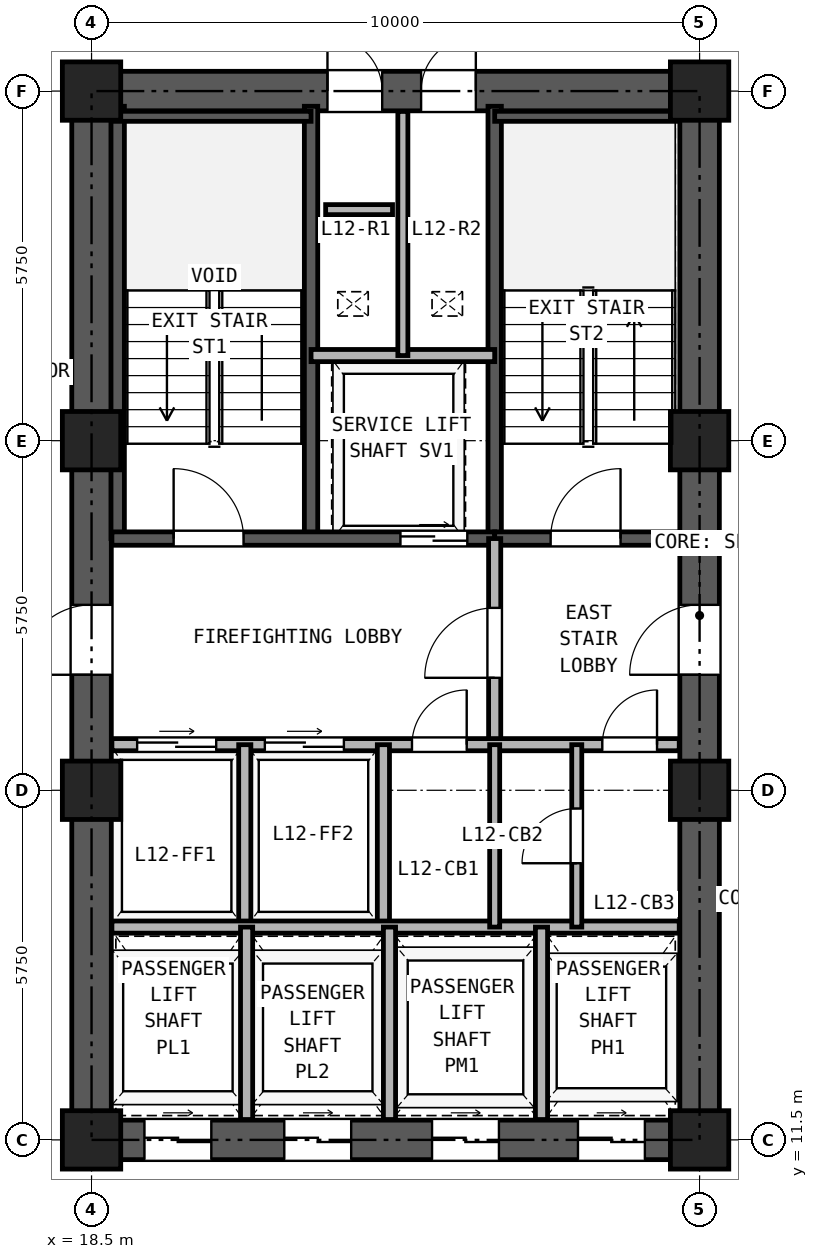
"""IFC4 building model, lengths in metres.
Left out: names, types, materials, properties, quantities, classifications, styles, units other than length and angle.
Written with IfcOpenShell. Run it as: python <this file> out.ifc"""

import sys

from ifc_helpers import new_model, si_unit, direction, frame, frame_2d, origin, origin_2d, place, context, subcontext, project, spatial, rectangle, hollow_rectangle, extrude, source, transform, mapped, element, fill, save


model = new_model("IFC4")
c1 = context("Model", 3, precision=1e-05, world=origin(), true_north=direction((0.0, 1.0)))
c2 = subcontext(c1, "Body", "Model", "MODEL_VIEW")
j1 = project(units=[si_unit("LENGTHUNIT", "METRE"), si_unit("PLANEANGLEUNIT", "RADIAN")], contexts=[c1])
p1 = place(None, origin())
s1 = spatial("IfcSite", under=j1, at=p1, CompositionType="ELEMENT")
p2 = place(p1, origin())
s2 = spatial("IfcBuilding", under=s1, at=p2, CompositionType="ELEMENT")
p3 = place(p2, frame((0.0, 0.0, 47.7)))
s3 = spatial("IfcBuildingStorey", under=s2, at=p3, CompositionType="ELEMENT", Elevation=47.7)
m1 = source(origin(), c2, "Body", "SweptSolid", [
    extrude(hollow_rectangle(XDim=0.96, YDim=0.96, WallThickness=0.06, at=origin_2d()), origin(), (0.0, 0.0, 1.0), 3.32),
])
for number, where, z_axis, x_axis in (
    (1, (18.5, 11.5, 0.0), (0.0, 0.0, 1.0), (1.0, 0.0, 0.0)),
    (2, (18.5, 17.25, 0.0), (0.0, 0.0, 1.0), (1.0, 0.0, 0.0)),
    (3, (18.5, 23.0, 0.0), (0.0, 0.0, 1.0), (1.0, 0.0, 0.0)),
    (4, (18.5, 28.75, 0.0), (0.0, 0.0, 1.0), (1.0, 0.0, 0.0)),
    (5, (28.5, 11.5, 0.0), (0.0, 0.0, 1.0), (1.0, 0.0, 0.0)),
    (6, (28.5, 17.25, 0.0), (0.0, 0.0, 1.0), (1.0, 0.0, 0.0)),
    (7, (28.5, 23.0, 0.0), (0.0, 0.0, 1.0), (1.0, 0.0, 0.0)),
    (8, (28.5, 28.75, 0.0), (0.0, 0.0, 1.0), (1.0, 0.0, 0.0)),
):
    element("IfcColumn", number, at=place(p3, frame(where, z_axis=z_axis, x_axis=x_axis)), inside=s3, PredefinedType="COLUMN", context=c2, shape_type="MappedRepresentation", body=[
        mapped(m1, transform((0.0, 0.0, 0.0), x_axis=(1.0, 0.0, 0.0), y_axis=(0.0, 1.0, 0.0), z_axis=(0.0, 0.0, 1.0), scale=1.0)),
    ])
p4 = place(p3, frame((18.175, 11.5, 0.0), z_axis=(0.0, 0.0, 1.0), x_axis=(1.0, 0.0, 0.0)))
e9 = element("IfcWall", 9, at=p4, inside=s3, PredefinedType="SHEAR", context=c2, shape_type="SweptSolid", body=[
    extrude(rectangle(XDim=10.65, YDim=0.65, at=frame_2d((5.325, 0.0))), origin(), (0.0, 0.0, 1.0), 3.32),
])
p5 = place(p4, frame((1.195, 0.0, 0.0)))
e10 = element("IfcOpeningElement", 10, at=p5, cuts=e9, PredefinedType="OPENING", context=c2, shape_type="SweptSolid", body=[
    extrude(rectangle(XDim=1.1, YDim=2.25, at=frame_2d((0.55, 1.125))), frame((0.0, 0.335, 0.0), z_axis=(0.0, -1.0, 0.0), x_axis=(1.0, 0.0, 0.0)), (0.0, 0.0, 1.0), 0.67),
])
p6 = place(p4, frame((3.495, 0.0, 0.0)))
e11 = element("IfcOpeningElement", 11, at=p6, cuts=e9, PredefinedType="OPENING", context=c2, shape_type="SweptSolid", body=[
    extrude(rectangle(XDim=1.1, YDim=2.25, at=frame_2d((0.55, 1.125))), frame((0.0, 0.335, 0.0), z_axis=(0.0, -1.0, 0.0), x_axis=(1.0, 0.0, 0.0)), (0.0, 0.0, 1.0), 0.67),
])
p7 = place(p4, frame((5.925, 0.0, 0.0)))
e12 = element("IfcOpeningElement", 12, at=p7, cuts=e9, PredefinedType="OPENING", context=c2, shape_type="SweptSolid", body=[
    extrude(rectangle(XDim=1.1, YDim=2.25, at=frame_2d((0.55, 1.125))), frame((0.0, 0.335, 0.0), z_axis=(0.0, -1.0, 0.0), x_axis=(1.0, 0.0, 0.0)), (0.0, 0.0, 1.0), 0.67),
])
p8 = place(p4, frame((8.325, 0.0, 0.0)))
e13 = element("IfcOpeningElement", 13, at=p8, cuts=e9, PredefinedType="OPENING", context=c2, shape_type="SweptSolid", body=[
    extrude(rectangle(XDim=1.1, YDim=2.25, at=frame_2d((0.55, 1.125))), frame((0.0, 0.335, 0.0), z_axis=(0.0, -1.0, 0.0), x_axis=(1.0, 0.0, 0.0)), (0.0, 0.0, 1.0), 0.67),
])
p9 = place(p3, frame((18.175, 28.75, 0.0), z_axis=(0.0, 0.0, 1.0), x_axis=(1.0, 0.0, 0.0)))
e14 = element("IfcWall", 14, at=p9, inside=s3, PredefinedType="SHEAR", context=c2, shape_type="SweptSolid", body=[
    extrude(rectangle(XDim=10.65, YDim=0.65, at=frame_2d((5.325, 0.0))), origin(), (0.0, 0.0, 1.0), 3.32),
])
p10 = place(p9, frame((4.205, 0.0, 0.0)))
e15 = element("IfcOpeningElement", 15, at=p10, cuts=e14, PredefinedType="OPENING", context=c2, shape_type="SweptSolid", body=[
    extrude(rectangle(XDim=0.9, YDim=2.05, at=frame_2d((0.45, 1.025))), frame((0.0, 0.335, 0.0), z_axis=(0.0, -1.0, 0.0), x_axis=(1.0, 0.0, 0.0)), (0.0, 0.0, 1.0), 0.67),
])
p11 = place(p9, frame((5.745, 0.0, 0.0)))
e16 = element("IfcOpeningElement", 16, at=p11, cuts=e14, PredefinedType="OPENING", context=c2, shape_type="SweptSolid", body=[
    extrude(rectangle(XDim=0.9, YDim=2.05, at=frame_2d((0.45, 1.025))), frame((0.0, 0.335, 0.0), z_axis=(0.0, -1.0, 0.0), x_axis=(1.0, 0.0, 0.0)), (0.0, 0.0, 1.0), 0.67),
])
p12 = place(p3, frame((18.5, 11.825, 0.0), z_axis=(0.0, 0.0, 1.0), x_axis=(0.0, 1.0, 0.0)))
e17 = element("IfcWall", 17, at=p12, inside=s3, PredefinedType="SHEAR", context=c2, shape_type="SweptSolid", body=[
    extrude(rectangle(XDim=16.6, YDim=0.65, at=frame_2d((8.3, 0.0))), origin(), (0.0, 0.0, 1.0), 3.32),
])
p13 = place(p12, frame((7.325, 0.0, 0.0)))
e18 = element("IfcOpeningElement", 18, at=p13, cuts=e17, PredefinedType="OPENING", context=c2, shape_type="SweptSolid", body=[
    extrude(rectangle(XDim=1.15, YDim=2.2, at=frame_2d((0.575, 1.1))), frame((0.0, 0.335, 0.0), z_axis=(0.0, -1.0, 0.0), x_axis=(1.0, 0.0, 0.0)), (0.0, 0.0, 1.0), 0.67),
])
p14 = place(p3, frame((28.5, 11.825, 0.0), z_axis=(0.0, 0.0, 1.0), x_axis=(0.0, 1.0, 0.0)))
e19 = element("IfcWall", 19, at=p14, inside=s3, PredefinedType="SHEAR", context=c2, shape_type="SweptSolid", body=[
    extrude(rectangle(XDim=16.6, YDim=0.65, at=frame_2d((8.3, 0.0))), origin(), (0.0, 0.0, 1.0), 3.32),
])
p15 = place(p14, frame((7.325, 0.0, 0.0)))
e20 = element("IfcOpeningElement", 20, at=p15, cuts=e19, PredefinedType="OPENING", context=c2, shape_type="SweptSolid", body=[
    extrude(rectangle(XDim=1.15, YDim=2.2, at=frame_2d((0.575, 1.1))), frame((0.0, 0.335, 0.0), z_axis=(0.0, -1.0, 0.0), x_axis=(1.0, 0.0, 0.0)), (0.0, 0.0, 1.0), 0.67),
])
for number, where, z_axis, x_axis in (
    (21, (18.93, 21.39, 0.0), (0.0, 0.0, 1.0), (0.0, 1.0, 0.0)),
    (22, (22.11, 21.39, 0.0), (0.0, 0.0, 1.0), (0.0, 1.0, 0.0)),
    (23, (25.13, 21.39, 0.0), (0.0, 0.0, 1.0), (0.0, 1.0, 0.0)),
):
    element("IfcWall", number, at=place(p3, frame(where, z_axis=z_axis, x_axis=x_axis)), inside=s3, PredefinedType="SOLIDWALL", context=c2, shape_type="SweptSolid", body=[
        extrude(rectangle(XDim=7.11, YDim=0.22, at=frame_2d((3.555, 0.0))), origin(), (0.0, 0.0, 1.0), 3.32),
    ])
p16 = place(p3, frame((18.835, 28.335, 0.0), z_axis=(0.0, 0.0, 1.0), x_axis=(1.0, 0.0, 0.0)))
e24 = element("IfcWall", 24, at=p16, inside=s3, PredefinedType="PARTITIONING", context=c2, shape_type="SweptSolid", body=[
    extrude(rectangle(XDim=3.275, YDim=0.165, at=frame_2d((1.638, 0.0))), origin(), (0.0, 0.0, 1.0), 3.32),
])
p17 = place(p3, frame((25.13, 28.335, 0.0), z_axis=(0.0, 0.0, 1.0), x_axis=(1.0, 0.0, 0.0)))
e25 = element("IfcWall", 25, at=p17, inside=s3, PredefinedType="PARTITIONING", context=c2, shape_type="SweptSolid", body=[
    extrude(rectangle(XDim=3.035, YDim=0.165, at=frame_2d((1.518, 0.0))), origin(), (0.0, 0.0, 1.0), 3.32),
])
p18 = place(p3, frame((18.835, 21.39, 0.0), z_axis=(0.0, 0.0, 1.0), x_axis=(1.0, 0.0, 0.0)))
e26 = element("IfcWall", 26, at=p18, inside=s3, PredefinedType="SOLIDWALL", context=c2, shape_type="SweptSolid", body=[
    extrude(rectangle(XDim=6.295, YDim=0.22, at=frame_2d((3.147, 0.0))), origin(), (0.0, 0.0, 1.0), 3.32),
])
p19 = place(p18, frame((1.015, 0.0, 0.0)))
e27 = element("IfcOpeningElement", 27, at=p19, cuts=e26, PredefinedType="OPENING", context=c2, shape_type="SweptSolid", body=[
    extrude(rectangle(XDim=1.15, YDim=2.2, at=frame_2d((0.575, 1.1))), frame((0.0, 0.12, 0.0), z_axis=(0.0, -1.0, 0.0), x_axis=(1.0, 0.0, 0.0)), (0.0, 0.0, 1.0), 0.24),
])
p20 = place(p18, frame((4.745, 0.0, 0.0)))
e28 = element("IfcOpeningElement", 28, at=p20, cuts=e26, PredefinedType="OPENING", context=c2, shape_type="SweptSolid", body=[
    extrude(rectangle(XDim=1.1, YDim=2.25, at=frame_2d((0.55, 1.125))), frame((0.0, 0.12, 0.0), z_axis=(0.0, -1.0, 0.0), x_axis=(1.0, 0.0, 0.0)), (0.0, 0.0, 1.0), 0.24),
])
p21 = place(p3, frame((25.13, 21.39, 0.0), z_axis=(0.0, 0.0, 1.0), x_axis=(1.0, 0.0, 0.0)))
e29 = element("IfcWall", 29, at=p21, inside=s3, PredefinedType="SOLIDWALL", context=c2, shape_type="SweptSolid", body=[
    extrude(rectangle(XDim=3.035, YDim=0.22, at=frame_2d((1.518, 0.0))), origin(), (0.0, 0.0, 1.0), 3.32),
])
p22 = place(p21, frame((0.92, 0.0, 0.0)))
e30 = element("IfcOpeningElement", 30, at=p22, cuts=e29, PredefinedType="OPENING", context=c2, shape_type="SweptSolid", body=[
    extrude(rectangle(XDim=1.15, YDim=2.2, at=frame_2d((0.575, 1.1))), frame((0.0, 0.12, 0.0), z_axis=(0.0, -1.0, 0.0), x_axis=(1.0, 0.0, 0.0)), (0.0, 0.0, 1.0), 0.24),
])
p23 = place(p3, frame((22.11, 24.4, 0.0), z_axis=(0.0, 0.0, 1.0), x_axis=(1.0, 0.0, 0.0)))
e31 = element("IfcWall", 31, at=p23, inside=s3, PredefinedType="PARTITIONING", context=c2, shape_type="SweptSolid", body=[
    extrude(rectangle(XDim=3.02, YDim=0.2, at=frame_2d((1.51, 0.0))), origin(), (0.0, 0.0, 1.0), 3.32),
])
p24 = place(p3, frame((23.62, 24.4, 0.0), z_axis=(0.0, 0.0, 1.0), x_axis=(0.0, 1.0, 0.0)))
e32 = element("IfcWall", 32, at=p24, inside=s3, PredefinedType="PARTITIONING", context=c2, shape_type="SweptSolid", body=[
    extrude(rectangle(XDim=4.015, YDim=0.165, at=frame_2d((2.008, 0.0))), origin(), (0.0, 0.0, 1.0), 3.32),
])
p25 = place(p3, frame((25.13, 18.0, 0.0), z_axis=(0.0, 0.0, 1.0), x_axis=(0.0, 1.0, 0.0)))
e33 = element("IfcWall", 33, at=p25, inside=s3, PredefinedType="PARTITIONING", context=c2, shape_type="SweptSolid", body=[
    extrude(rectangle(XDim=3.39, YDim=0.2, at=frame_2d((1.695, 0.0))), origin(), (0.0, 0.0, 1.0), 3.32),
])
p26 = place(p25, frame((1.1, 0.0, 0.0)))
e34 = element("IfcOpeningElement", 34, at=p26, cuts=e33, PredefinedType="OPENING", context=c2, shape_type="SweptSolid", body=[
    extrude(rectangle(XDim=1.15, YDim=2.2, at=frame_2d((0.575, 1.1))), frame((0.0, 0.11, 0.0), z_axis=(0.0, -1.0, 0.0), x_axis=(1.0, 0.0, 0.0)), (0.0, 0.0, 1.0), 0.22),
])
p27 = place(p3, frame((18.835, 18.0, 0.0), z_axis=(0.0, 0.0, 1.0), x_axis=(1.0, 0.0, 0.0)))
e35 = element("IfcWall", 35, at=p27, inside=s3, PredefinedType="PARTITIONING", context=c2, shape_type="SweptSolid", body=[
    extrude(rectangle(XDim=9.33, YDim=0.2, at=frame_2d((4.665, 0.0))), origin(), (0.0, 0.0, 1.0), 3.32),
])
p28 = place(p27, frame((0.415, 0.0, 0.0)))
e36 = element("IfcOpeningElement", 36, at=p28, cuts=e35, PredefinedType="OPENING", context=c2, shape_type="SweptSolid", body=[
    extrude(rectangle(XDim=1.3, YDim=2.3, at=frame_2d((0.65, 1.15))), frame((0.0, 0.11, 0.0), z_axis=(0.0, -1.0, 0.0), x_axis=(1.0, 0.0, 0.0)), (0.0, 0.0, 1.0), 0.22),
])
p29 = place(p27, frame((2.515, 0.0, 0.0)))
e37 = element("IfcOpeningElement", 37, at=p29, cuts=e35, PredefinedType="OPENING", context=c2, shape_type="SweptSolid", body=[
    extrude(rectangle(XDim=1.3, YDim=2.3, at=frame_2d((0.65, 1.15))), frame((0.0, 0.11, 0.0), z_axis=(0.0, -1.0, 0.0), x_axis=(1.0, 0.0, 0.0)), (0.0, 0.0, 1.0), 0.22),
])
p30 = place(p27, frame((4.935, 0.0, 0.0)))
e38 = element("IfcOpeningElement", 38, at=p30, cuts=e35, PredefinedType="OPENING", context=c2, shape_type="SweptSolid", body=[
    extrude(rectangle(XDim=0.9, YDim=2.05, at=frame_2d((0.45, 1.025))), frame((0.0, 0.11, 0.0), z_axis=(0.0, -1.0, 0.0), x_axis=(1.0, 0.0, 0.0)), (0.0, 0.0, 1.0), 0.22),
])
p31 = place(p27, frame((8.065, 0.0, 0.0)))
e39 = element("IfcOpeningElement", 39, at=p31, cuts=e35, PredefinedType="OPENING", context=c2, shape_type="SweptSolid", body=[
    extrude(rectangle(XDim=0.9, YDim=2.05, at=frame_2d((0.45, 1.025))), frame((0.0, 0.11, 0.0), z_axis=(0.0, -1.0, 0.0), x_axis=(1.0, 0.0, 0.0)), (0.0, 0.0, 1.0), 0.22),
])
for number, where, z_axis, x_axis in (
    (40, (21.02, 15.0, 0.0), (0.0, 0.0, 1.0), (0.0, 1.0, 0.0)),
    (41, (23.3, 15.0, 0.0), (0.0, 0.0, 1.0), (0.0, 1.0, 0.0)),
):
    element("IfcWall", number, at=place(p3, frame(where, z_axis=z_axis, x_axis=x_axis)), inside=s3, PredefinedType="PARTITIONING", context=c2, shape_type="SweptSolid", body=[
        extrude(rectangle(XDim=3.0, YDim=0.2, at=frame_2d((1.5, 0.0))), origin(), (0.0, 0.0, 1.0), 3.32),
    ])
p32 = place(p3, frame((18.835, 15.0, 0.0), z_axis=(0.0, 0.0, 1.0), x_axis=(1.0, 0.0, 0.0)))
e42 = element("IfcWall", 42, at=p32, inside=s3, PredefinedType="PARTITIONING", context=c2, shape_type="SweptSolid", body=[
    extrude(rectangle(XDim=9.33, YDim=0.2, at=frame_2d((4.665, 0.0))), origin(), (0.0, 0.0, 1.0), 3.32),
])
p33 = place(p3, frame((25.13, 15.0, 0.0), z_axis=(0.0, 0.0, 1.0), x_axis=(0.0, 1.0, 0.0)))
e43 = element("IfcWall", 43, at=p33, inside=s3, PredefinedType="PARTITIONING", context=c2, shape_type="SweptSolid", body=[
    extrude(rectangle(XDim=3.0, YDim=0.165, at=frame_2d((1.5, 0.0))), origin(), (0.0, 0.0, 1.0), 3.32),
])
p34 = place(p3, frame((26.48, 15.0, 0.0), z_axis=(0.0, 0.0, 1.0), x_axis=(0.0, 1.0, 0.0)))
e44 = element("IfcWall", 44, at=p34, inside=s3, PredefinedType="PARTITIONING", context=c2, shape_type="SweptSolid", body=[
    extrude(rectangle(XDim=3.0, YDim=0.165, at=frame_2d((1.5, 0.0))), origin(), (0.0, 0.0, 1.0), 3.32),
])
p35 = place(p34, frame((1.05, 0.0, 0.0)))
e45 = element("IfcOpeningElement", 45, at=p35, cuts=e44, PredefinedType="OPENING", context=c2, shape_type="SweptSolid", body=[
    extrude(rectangle(XDim=0.9, YDim=2.05, at=frame_2d((0.45, 1.025))), frame((0.0, 0.093, 0.0), z_axis=(0.0, -1.0, 0.0), x_axis=(1.0, 0.0, 0.0)), (0.0, 0.0, 1.0), 0.185),
])
for number, where, z_axis, x_axis in (
    (46, (21.05, 11.835, 0.0), (0.0, 0.0, 1.0), (0.0, 1.0, 0.0)),
    (47, (23.4, 11.835, 0.0), (0.0, 0.0, 1.0), (0.0, 1.0, 0.0)),
    (48, (25.9, 11.835, 0.0), (0.0, 0.0, 1.0), (0.0, 1.0, 0.0)),
):
    element("IfcWall", number, at=place(p3, frame(where, z_axis=z_axis, x_axis=x_axis)), inside=s3, PredefinedType="PARTITIONING", context=c2, shape_type="SweptSolid", body=[
        extrude(rectangle(XDim=3.165, YDim=0.2, at=frame_2d((1.583, 0.0))), origin(), (0.0, 0.0, 1.0), 3.32),
    ])
p36 = place(p3, frame((22.35, 26.8, 0.0), z_axis=(0.0, 0.0, 1.0), x_axis=(1.0, 0.0, 0.0)))
e49 = element("IfcWall", 49, at=p36, inside=s3, PredefinedType="PARTITIONING", context=c2, shape_type="SweptSolid", body=[
    extrude(rectangle(XDim=1.1, YDim=0.165, at=frame_2d((0.55, 0.0))), origin(), (0.0, 0.0, 1.0), 3.32),
])
p37 = place(p19, frame((1.15, 0.0, 0.0), z_axis=(0.0, 0.0, 1.0), x_axis=(-1.0, 0.0, 0.0)))
e50 = element("IfcDoor", 50, at=p37, inside=s3, OperationType="SINGLE_SWING_LEFT", PredefinedType="DOOR", context=c2, shape_type="SweptSolid", body=[
    extrude(rectangle(XDim=1.15, YDim=2.2, at=frame_2d((0.575, 1.1))), frame((0.0, 0.025, 0.0), z_axis=(0.0, -1.0, 0.0), x_axis=(1.0, 0.0, 0.0)), (0.0, 0.0, 1.0), 0.05),
])
fill(e27, e50)
p38 = place(p22, frame((1.15, 0.0, 0.0), z_axis=(0.0, 0.0, 1.0), x_axis=(-1.0, 0.0, 0.0)))
e51 = element("IfcDoor", 51, at=p38, inside=s3, OperationType="SINGLE_SWING_RIGHT", PredefinedType="DOOR", context=c2, shape_type="SweptSolid", body=[
    extrude(rectangle(XDim=1.15, YDim=2.2, at=frame_2d((0.575, 1.1))), frame((0.0, 0.025, 0.0), z_axis=(0.0, -1.0, 0.0), x_axis=(1.0, 0.0, 0.0)), (0.0, 0.0, 1.0), 0.05),
])
fill(e30, e51)
p39 = place(p20, frame((1.1, 0.0, 0.0), z_axis=(0.0, 0.0, 1.0), x_axis=(-1.0, 0.0, 0.0)))
e52 = element("IfcDoor", 52, at=p39, inside=s3, OperationType="DOUBLE_DOOR_SLIDING", PredefinedType="DOOR", context=c2, shape_type="SweptSolid", body=[
    extrude(rectangle(XDim=1.1, YDim=2.25, at=frame_2d((0.55, 1.125))), frame((0.0, 0.025, 0.0), z_axis=(0.0, -1.0, 0.0), x_axis=(1.0, 0.0, 0.0)), (0.0, 0.0, 1.0), 0.05),
])
fill(e28, e52)
p40 = place(p26, origin())
e53 = element("IfcDoor", 53, at=p40, inside=s3, OperationType="SINGLE_SWING_LEFT", PredefinedType="DOOR", context=c2, shape_type="SweptSolid", body=[
    extrude(rectangle(XDim=1.15, YDim=2.2, at=frame_2d((0.575, 1.1))), frame((0.0, 0.025, 0.0), z_axis=(0.0, -1.0, 0.0), x_axis=(1.0, 0.0, 0.0)), (0.0, 0.0, 1.0), 0.05),
])
fill(e34, e53)
p41 = place(p28, origin())
e54 = element("IfcDoor", 54, at=p41, inside=s3, OperationType="DOUBLE_DOOR_SLIDING", PredefinedType="DOOR", context=c2, shape_type="SweptSolid", body=[
    extrude(rectangle(XDim=1.3, YDim=2.3, at=frame_2d((0.65, 1.15))), frame((0.0, 0.025, 0.0), z_axis=(0.0, -1.0, 0.0), x_axis=(1.0, 0.0, 0.0)), (0.0, 0.0, 1.0), 0.05),
])
fill(e36, e54)
p42 = place(p29, origin())
e55 = element("IfcDoor", 55, at=p42, inside=s3, OperationType="DOUBLE_DOOR_SLIDING", PredefinedType="DOOR", context=c2, shape_type="SweptSolid", body=[
    extrude(rectangle(XDim=1.3, YDim=2.3, at=frame_2d((0.65, 1.15))), frame((0.0, 0.025, 0.0), z_axis=(0.0, -1.0, 0.0), x_axis=(1.0, 0.0, 0.0)), (0.0, 0.0, 1.0), 0.05),
])
fill(e37, e55)
p43 = place(p30, frame((0.9, 0.0, 0.0), z_axis=(0.0, 0.0, 1.0), x_axis=(-1.0, 0.0, 0.0)))
e56 = element("IfcDoor", 56, at=p43, inside=s3, OperationType="SINGLE_SWING_RIGHT", PredefinedType="DOOR", context=c2, shape_type="SweptSolid", body=[
    extrude(rectangle(XDim=0.9, YDim=2.05, at=frame_2d((0.45, 1.025))), frame((0.0, 0.025, 0.0), z_axis=(0.0, -1.0, 0.0), x_axis=(1.0, 0.0, 0.0)), (0.0, 0.0, 1.0), 0.05),
])
fill(e38, e56)
p44 = place(p35, origin())
e57 = element("IfcDoor", 57, at=p44, inside=s3, OperationType="SINGLE_SWING_LEFT", PredefinedType="DOOR", context=c2, shape_type="SweptSolid", body=[
    extrude(rectangle(XDim=0.9, YDim=2.05, at=frame_2d((0.45, 1.025))), frame((0.0, 0.025, 0.0), z_axis=(0.0, -1.0, 0.0), x_axis=(1.0, 0.0, 0.0)), (0.0, 0.0, 1.0), 0.05),
])
fill(e45, e57)
p45 = place(p31, frame((0.9, 0.0, 0.0), z_axis=(0.0, 0.0, 1.0), x_axis=(-1.0, 0.0, 0.0)))
e58 = element("IfcDoor", 58, at=p45, inside=s3, OperationType="SINGLE_SWING_RIGHT", PredefinedType="DOOR", context=c2, shape_type="SweptSolid", body=[
    extrude(rectangle(XDim=0.9, YDim=2.05, at=frame_2d((0.45, 1.025))), frame((0.0, 0.025, 0.0), z_axis=(0.0, -1.0, 0.0), x_axis=(1.0, 0.0, 0.0)), (0.0, 0.0, 1.0), 0.05),
])
fill(e39, e58)
p46 = place(p13, frame((1.15, 0.0, 0.0), z_axis=(0.0, 0.0, 1.0), x_axis=(-1.0, 0.0, 0.0)))
e59 = element("IfcDoor", 59, at=p46, inside=s3, OperationType="SINGLE_SWING_LEFT", PredefinedType="DOOR", context=c2, shape_type="SweptSolid", body=[
    extrude(rectangle(XDim=1.15, YDim=2.2, at=frame_2d((0.575, 1.1))), frame((0.0, 0.025, 0.0), z_axis=(0.0, -1.0, 0.0), x_axis=(1.0, 0.0, 0.0)), (0.0, 0.0, 1.0), 0.05),
])
fill(e18, e59)
p47 = place(p15, origin())
e60 = element("IfcDoor", 60, at=p47, inside=s3, OperationType="SINGLE_SWING_LEFT", PredefinedType="DOOR", context=c2, shape_type="SweptSolid", body=[
    extrude(rectangle(XDim=1.15, YDim=2.2, at=frame_2d((0.575, 1.1))), frame((0.0, 0.025, 0.0), z_axis=(0.0, -1.0, 0.0), x_axis=(1.0, 0.0, 0.0)), (0.0, 0.0, 1.0), 0.05),
])
fill(e20, e60)
p48 = place(p10, origin())
e61 = element("IfcDoor", 61, at=p48, inside=s3, OperationType="SINGLE_SWING_LEFT", PredefinedType="DOOR", context=c2, shape_type="SweptSolid", body=[
    extrude(rectangle(XDim=0.9, YDim=2.05, at=frame_2d((0.45, 1.025))), frame((0.0, 0.025, 0.0), z_axis=(0.0, -1.0, 0.0), x_axis=(1.0, 0.0, 0.0)), (0.0, 0.0, 1.0), 0.05),
])
fill(e15, e61)
p49 = place(p11, origin())
e62 = element("IfcDoor", 62, at=p49, inside=s3, OperationType="SINGLE_SWING_RIGHT", PredefinedType="DOOR", context=c2, shape_type="SweptSolid", body=[
    extrude(rectangle(XDim=0.9, YDim=2.05, at=frame_2d((0.45, 1.025))), frame((0.0, 0.025, 0.0), z_axis=(0.0, -1.0, 0.0), x_axis=(1.0, 0.0, 0.0)), (0.0, 0.0, 1.0), 0.05),
])
fill(e16, e62)
p50 = place(p5, frame((1.1, 0.0, 0.0), z_axis=(0.0, 0.0, 1.0), x_axis=(-1.0, 0.0, 0.0)))
e63 = element("IfcDoor", 63, at=p50, inside=s3, OperationType="DOUBLE_DOOR_SLIDING", PredefinedType="DOOR", context=c2, shape_type="SweptSolid", body=[
    extrude(rectangle(XDim=1.1, YDim=2.25, at=frame_2d((0.55, 1.125))), frame((0.0, 0.025, 0.0), z_axis=(0.0, -1.0, 0.0), x_axis=(1.0, 0.0, 0.0)), (0.0, 0.0, 1.0), 0.05),
])
fill(e10, e63)
p51 = place(p6, frame((1.1, 0.0, 0.0), z_axis=(0.0, 0.0, 1.0), x_axis=(-1.0, 0.0, 0.0)))
e64 = element("IfcDoor", 64, at=p51, inside=s3, OperationType="DOUBLE_DOOR_SLIDING", PredefinedType="DOOR", context=c2, shape_type="SweptSolid", body=[
    extrude(rectangle(XDim=1.1, YDim=2.25, at=frame_2d((0.55, 1.125))), frame((0.0, 0.025, 0.0), z_axis=(0.0, -1.0, 0.0), x_axis=(1.0, 0.0, 0.0)), (0.0, 0.0, 1.0), 0.05),
])
fill(e11, e64)
p52 = place(p7, frame((1.1, 0.0, 0.0), z_axis=(0.0, 0.0, 1.0), x_axis=(-1.0, 0.0, 0.0)))
e65 = element("IfcDoor", 65, at=p52, inside=s3, OperationType="DOUBLE_DOOR_SLIDING", PredefinedType="DOOR", context=c2, shape_type="SweptSolid", body=[
    extrude(rectangle(XDim=1.1, YDim=2.25, at=frame_2d((0.55, 1.125))), frame((0.0, 0.025, 0.0), z_axis=(0.0, -1.0, 0.0), x_axis=(1.0, 0.0, 0.0)), (0.0, 0.0, 1.0), 0.05),
])
fill(e12, e65)
p53 = place(p8, frame((1.1, 0.0, 0.0), z_axis=(0.0, 0.0, 1.0), x_axis=(-1.0, 0.0, 0.0)))
e66 = element("IfcDoor", 66, at=p53, inside=s3, OperationType="DOUBLE_DOOR_SLIDING", PredefinedType="DOOR", context=c2, shape_type="SweptSolid", body=[
    extrude(rectangle(XDim=1.1, YDim=2.25, at=frame_2d((0.55, 1.125))), frame((0.0, 0.025, 0.0), z_axis=(0.0, -1.0, 0.0), x_axis=(1.0, 0.0, 0.0)), (0.0, 0.0, 1.0), 0.05),
])
fill(e13, e66)
save(model, sys.argv[1])
